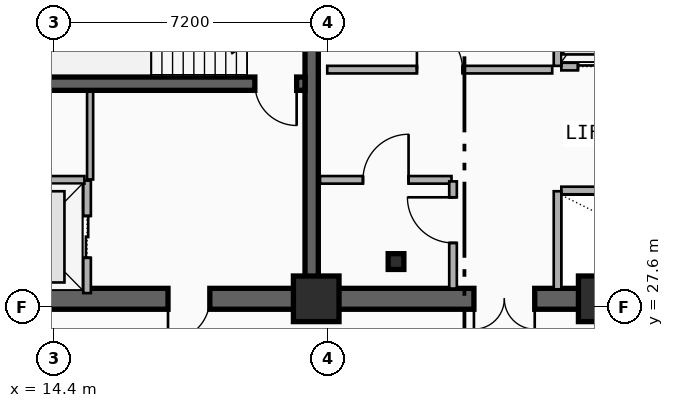
"""IFC4 building model, lengths in metres.
Left out: names, types, materials, properties, quantities, classifications, styles, units other than length and angle.
Written with IfcOpenShell. Run it as: python <this file> out.ifc"""

import sys

from ifc_helpers import new_model, si_unit, direction, frame, frame_2d, origin, origin_2d, place, context, subcontext, project, spatial, rectangle, i_section, extrude, element, fill, save


model = new_model("IFC4")
c1 = context("Model", 3, precision=1e-05, world=origin(), true_north=direction((0.0, 1.0)))
c2 = subcontext(c1, "Body", "Model", "MODEL_VIEW")
j1 = project(units=[si_unit("LENGTHUNIT", "METRE"), si_unit("PLANEANGLEUNIT", "RADIAN")], contexts=[c1])
p1 = place(None, origin())
s1 = spatial("IfcSite", under=j1, at=p1, CompositionType="ELEMENT")
p2 = place(p1, origin())
s2 = spatial("IfcBuilding", under=s1, at=p2, CompositionType="ELEMENT")
p3 = place(p2, frame((0.0, 0.0, 166.1)))
s3 = spatial("IfcBuildingStorey", under=s2, at=p3, CompositionType="ELEMENT", Elevation=166.1)
p4 = place(p3, frame((21.18, 27.82, 0.0), z_axis=(0.0, 0.0, 1.0), x_axis=(-1.0, 0.0, 0.0)))
e1 = element("IfcWall", 1, at=p4, inside=s3, PredefinedType="SHEAR", context=c2, shape_type="SweptSolid", body=[
    extrude(rectangle(XDim=9.03, YDim=0.55, at=frame_2d((4.515, 0.0))), origin(), (0.0, 0.0, 1.0), 3.55),
])
p5 = place(p4, frame((2.68, 0.0, 0.0)))
e2 = element("IfcOpeningElement", 2, at=p5, cuts=e1, PredefinedType="OPENING", context=c2, shape_type="SweptSolid", body=[
    extrude(rectangle(XDim=1.1, YDim=2.15, at=frame_2d((0.55, 1.075))), frame((0.0, 0.285, 0.0), z_axis=(0.0, -1.0, 0.0), x_axis=(1.0, 0.0, 0.0)), (0.0, 0.0, 1.0), 0.57),
])
p6 = place(p3, frame((33.15, 27.82, 0.0), z_axis=(0.0, 0.0, 1.0), x_axis=(-1.0, 0.0, 0.0)))
e3 = element("IfcWall", 3, at=p6, inside=s3, PredefinedType="SHEAR", context=c2, shape_type="SweptSolid", body=[
    extrude(rectangle(XDim=11.97, YDim=0.55, at=frame_2d((5.985, 0.0))), origin(), (0.0, 0.0, 1.0), 3.55),
])
p7 = place(p6, frame((6.1, 0.0, 0.0)))
e4 = element("IfcOpeningElement", 4, at=p7, cuts=e3, PredefinedType="OPENING", context=c2, shape_type="SweptSolid", body=[
    extrude(rectangle(XDim=1.6, YDim=2.2, at=frame_2d((0.8, 1.1))), frame((0.0, 0.285, 0.0), z_axis=(0.0, -1.0, 0.0), x_axis=(1.0, 0.0, 0.0)), (0.0, 0.0, 1.0), 0.57),
])
p8 = place(p3, frame((21.18, 28.095, 0.0), z_axis=(0.0, 0.0, 1.0), x_axis=(0.0, 1.0, 0.0)))
e5 = element("IfcWall", 5, at=p8, inside=s3, PredefinedType="SHEAR", context=c2, shape_type="SweptSolid", body=[
    extrude(rectangle(XDim=8.68, YDim=0.35, at=frame_2d((4.34, 0.0))), origin(), (0.0, 0.0, 1.0), 3.55),
])
p9 = place(p3, frame((21.005, 33.48, 0.0), z_axis=(0.0, 0.0, 1.0), x_axis=(-1.0, 0.0, 0.0)))
e6 = element("IfcWall", 6, at=p9, inside=s3, PredefinedType="SHEAR", context=c2, shape_type="SweptSolid", body=[
    extrude(rectangle(XDim=8.58, YDim=0.35, at=frame_2d((4.29, 0.0))), origin(), (0.0, 0.0, 1.0), 3.55),
])
p10 = place(p9, frame((0.22, 0.0, 0.0)))
e7 = element("IfcOpeningElement", 7, at=p10, cuts=e6, PredefinedType="OPENING", context=c2, shape_type="SweptSolid", body=[
    extrude(rectangle(XDim=1.1, YDim=2.15, at=frame_2d((0.55, 1.075))), frame((0.0, 0.185, 0.0), z_axis=(0.0, -1.0, 0.0), x_axis=(1.0, 0.0, 0.0)), (0.0, 0.0, 1.0), 0.37),
])
p11 = place(p3, frame((23.4, 28.8, 0.0), z_axis=(0.0, 0.0, 1.0), x_axis=(1.0, 0.0, 0.0)))
e8 = element("IfcColumn", 8, at=p11, inside=s3, PredefinedType="COLUMN", context=c2, shape_type="SweptSolid", body=[
    extrude(i_section(OverallWidth=0.413, OverallDepth=0.415, WebThickness=0.03, FlangeThickness=0.047, FilletRadius=0.015, at=origin_2d()), origin(), (0.0, 0.0, 1.0), 3.55),
])
for number, where, z_axis, x_axis in (
    (9, (21.3, 27.82, 0.0), (0.0, 0.0, 1.0), (1.0, 0.0, 0.0)),
    (10, (28.8, 27.82, 0.0), (0.0, 0.0, 1.0), (1.0, 0.0, 0.0)),
):
    element("IfcColumn", number, at=place(p3, frame(where, z_axis=z_axis, x_axis=x_axis)), inside=s3, PredefinedType="COLUMN", context=c2, shape_type="SweptSolid", body=[
        extrude(rectangle(XDim=1.2, YDim=1.2, at=origin_2d()), origin(), (0.0, 0.0, 1.0), 3.55),
    ])
p12 = place(p3, frame((15.27, 27.97, 0.0), z_axis=(0.0, 0.0, 1.0), x_axis=(0.0, 1.0, 0.0)))
e11 = element("IfcWall", 11, at=p12, inside=s3, PredefinedType="PARTITIONING", context=c2, shape_type="SweptSolid", body=[
    extrude(rectangle(XDim=2.96, YDim=0.2, at=frame_2d((1.48, 0.0))), origin(), (0.0, 0.0, 1.0), 2.36),
])
p13 = place(p12, frame((0.93, 0.0, 0.0)))
e12 = element("IfcOpeningElement", 12, at=p13, cuts=e11, PredefinedType="OPENING", context=c2, shape_type="SweptSolid", body=[
    extrude(rectangle(XDim=1.1, YDim=2.15, at=frame_2d((0.55, 1.075))), frame((0.0, 0.11, 0.0), z_axis=(0.0, -1.0, 0.0), x_axis=(1.0, 0.0, 0.0)), (0.0, 0.0, 1.0), 0.22),
])
p14 = place(p3, frame((12.45, 30.95, 0.0), z_axis=(0.0, 0.0, 1.0), x_axis=(1.0, 0.0, 0.0)))
e13 = element("IfcWall", 13, at=p14, inside=s3, PredefinedType="PARTITIONING", context=c2, shape_type="SweptSolid", body=[
    extrude(rectangle(XDim=2.75, YDim=0.2, at=frame_2d((1.375, 0.0))), origin(), (0.0, 0.0, 1.0), 2.36),
])
p15 = place(p3, frame((27.75, 30.67, 0.0), z_axis=(0.0, 0.0, 1.0), x_axis=(1.0, 0.0, 0.0)))
e14 = element("IfcWall", 14, at=p15, inside=s3, PredefinedType="PARTITIONING", context=c2, shape_type="SweptSolid", body=[
    extrude(rectangle(XDim=1.975, YDim=0.2, at=frame_2d((0.988, 0.0))), origin(), (0.0, 0.0, 1.0), 2.36),
])
p16 = place(p3, frame((27.65, 28.07, 0.0), z_axis=(0.0, 0.0, 1.0), x_axis=(0.0, 1.0, 0.0)))
e15 = element("IfcWall", 15, at=p16, inside=s3, PredefinedType="PARTITIONING", context=c2, shape_type="SweptSolid", body=[
    extrude(rectangle(XDim=2.58, YDim=0.2, at=frame_2d((1.29, 0.0))), origin(), (0.0, 0.0, 1.0), 2.36),
])
p17 = place(p3, frame((27.75, 33.93, 0.0), z_axis=(0.0, 0.0, 1.0), x_axis=(1.0, 0.0, 0.0)))
e16 = element("IfcWall", 16, at=p17, inside=s3, PredefinedType="PARTITIONING", context=c2, shape_type="SweptSolid", body=[
    extrude(rectangle(XDim=1.975, YDim=0.2, at=frame_2d((0.988, 0.0))), origin(), (0.0, 0.0, 1.0), 2.36),
])
p18 = place(p17, frame((0.438, 0.0, 0.0)))
e17 = element("IfcOpeningElement", 17, at=p18, cuts=e16, PredefinedType="OPENING", context=c2, shape_type="SweptSolid", body=[
    extrude(rectangle(XDim=1.1, YDim=2.15, at=frame_2d((0.55, 1.075))), frame((0.0, 0.11, 0.0), z_axis=(0.0, -1.0, 0.0), x_axis=(1.0, 0.0, 0.0)), (0.0, 0.0, 1.0), 0.22),
])
p19 = place(p3, frame((27.65, 33.95, 0.0), z_axis=(0.0, 0.0, 1.0), x_axis=(0.0, 1.0, 0.0)))
e18 = element("IfcWall", 18, at=p19, inside=s3, PredefinedType="PARTITIONING", context=c2, shape_type="SweptSolid", body=[
    extrude(rectangle(XDim=2.68, YDim=0.2, at=frame_2d((1.34, 0.0))), origin(), (0.0, 0.0, 1.0), 2.36),
])
p20 = place(p3, frame((21.4, 30.95, 0.0), z_axis=(0.0, 0.0, 1.0), x_axis=(1.0, 0.0, 0.0)))
e19 = element("IfcWall", 19, at=p20, inside=s3, PredefinedType="PARTITIONING", context=c2, shape_type="SweptSolid", body=[
    extrude(rectangle(XDim=3.46, YDim=0.2, at=frame_2d((1.73, 0.0))), origin(), (0.0, 0.0, 1.0), 2.36),
])
p21 = place(p20, frame((1.13, 0.0, 0.0)))
e20 = element("IfcOpeningElement", 20, at=p21, cuts=e19, PredefinedType="OPENING", context=c2, shape_type="SweptSolid", body=[
    extrude(rectangle(XDim=1.2, YDim=2.15, at=frame_2d((0.6, 1.075))), frame((0.0, 0.11, 0.0), z_axis=(0.0, -1.0, 0.0), x_axis=(1.0, 0.0, 0.0)), (0.0, 0.0, 1.0), 0.22),
])
p22 = place(p3, frame((21.59, 33.85, 0.0), z_axis=(0.0, 0.0, 1.0), x_axis=(1.0, 0.0, 0.0)))
e21 = element("IfcWall", 21, at=p22, inside=s3, PredefinedType="PARTITIONING", context=c2, shape_type="SweptSolid", body=[
    extrude(rectangle(XDim=5.92, YDim=0.2, at=frame_2d((2.96, 0.0))), origin(), (0.0, 0.0, 1.0), 2.36),
])
p23 = place(p22, frame((2.36, 0.0, 0.0)))
e22 = element("IfcOpeningElement", 22, at=p23, cuts=e21, PredefinedType="OPENING", context=c2, shape_type="SweptSolid", body=[
    extrude(rectangle(XDim=1.2, YDim=2.15, at=frame_2d((0.6, 1.075))), frame((0.0, 0.11, 0.0), z_axis=(0.0, -1.0, 0.0), x_axis=(1.0, 0.0, 0.0)), (0.0, 0.0, 1.0), 0.22),
])
p24 = place(p3, frame((24.9, 28.09, 0.0), z_axis=(0.0, 0.0, 1.0), x_axis=(0.0, 1.0, 0.0)))
e23 = element("IfcWall", 23, at=p24, inside=s3, PredefinedType="PARTITIONING", context=c2, shape_type="SweptSolid", body=[
    extrude(rectangle(XDim=2.82, YDim=0.2, at=frame_2d((1.41, 0.0))), origin(), (0.0, 0.0, 1.0), 2.67),
])
p25 = place(p24, frame((1.201, 0.0, 0.0)))
e24 = element("IfcOpeningElement", 24, at=p25, cuts=e23, PredefinedType="OPENING", context=c2, shape_type="SweptSolid", body=[
    extrude(rectangle(XDim=1.2, YDim=2.15, at=frame_2d((0.6, 1.075))), frame((0.0, 0.11, 0.0), z_axis=(0.0, -1.0, 0.0), x_axis=(1.0, 0.0, 0.0)), (0.0, 0.0, 1.0), 0.22),
])
p26 = place(p3, frame((15.35, 30.96, 0.0), z_axis=(0.0, 0.0, 1.0), x_axis=(0.0, 1.0, 0.0)))
e25 = element("IfcWall", 25, at=p26, inside=s3, PredefinedType="PARTITIONING", context=c2, shape_type="SweptSolid", body=[
    extrude(rectangle(XDim=2.31, YDim=0.16, at=frame_2d((1.155, 0.0))), origin(), (0.0, 0.0, 1.0), 3.29),
])
p27 = place(p13, origin())
e26 = element("IfcDoor", 26, at=p27, inside=s3, OperationType="DOUBLE_DOOR_SLIDING", PredefinedType="DOOR", context=c2, shape_type="SweptSolid", body=[
    extrude(rectangle(XDim=1.1, YDim=2.15, at=frame_2d((0.55, 1.075))), frame((0.0, 0.025, 0.0), z_axis=(0.0, -1.0, 0.0), x_axis=(1.0, 0.0, 0.0)), (0.0, 0.0, 1.0), 0.05),
])
fill(e12, e26)
p28 = place(p18, origin())
e27 = element("IfcDoor", 27, at=p28, inside=s3, OperationType="DOUBLE_DOOR_SLIDING", PredefinedType="DOOR", context=c2, shape_type="SweptSolid", body=[
    extrude(rectangle(XDim=1.1, YDim=2.15, at=frame_2d((0.55, 1.075))), frame((0.0, 0.025, 0.0), z_axis=(0.0, -1.0, 0.0), x_axis=(1.0, 0.0, 0.0)), (0.0, 0.0, 1.0), 0.05),
])
fill(e17, e27)
p29 = place(p10, origin())
e28 = element("IfcDoor", 28, at=p29, inside=s3, OperationType="SINGLE_SWING_LEFT", PredefinedType="DOOR", context=c2, shape_type="SweptSolid", body=[
    extrude(rectangle(XDim=1.1, YDim=2.15, at=frame_2d((0.55, 1.075))), frame((0.0, 0.025, 0.0), z_axis=(0.0, -1.0, 0.0), x_axis=(1.0, 0.0, 0.0)), (0.0, 0.0, 1.0), 0.05),
])
fill(e7, e28)
p30 = place(p5, origin())
e29 = element("IfcDoor", 29, at=p30, inside=s3, OperationType="SINGLE_SWING_RIGHT", PredefinedType="DOOR", context=c2, shape_type="SweptSolid", body=[
    extrude(rectangle(XDim=1.1, YDim=2.15, at=frame_2d((0.55, 1.075))), frame((0.0, 0.025, 0.0), z_axis=(0.0, -1.0, 0.0), x_axis=(1.0, 0.0, 0.0)), (0.0, 0.0, 1.0), 0.05),
])
fill(e2, e29)
p31 = place(p7, origin())
e30 = element("IfcDoor", 30, at=p31, inside=s3, OperationType="SINGLE_SWING_LEFT", PredefinedType="DOOR", context=c2, shape_type="SweptSolid", body=[
    extrude(rectangle(XDim=1.6, YDim=2.2, at=frame_2d((0.8, 1.1))), frame((0.0, 0.025, 0.0), z_axis=(0.0, -1.0, 0.0), x_axis=(1.0, 0.0, 0.0)), (0.0, 0.0, 1.0), 0.05),
])
fill(e4, e30)
p32 = place(p21, origin())
e31 = element("IfcDoor", 31, at=p32, inside=s3, OperationType="SINGLE_SWING_RIGHT", PredefinedType="DOOR", context=c2, shape_type="SweptSolid", body=[
    extrude(rectangle(XDim=1.2, YDim=2.15, at=frame_2d((0.6, 1.075))), frame((0.0, 0.025, 0.0), z_axis=(0.0, -1.0, 0.0), x_axis=(1.0, 0.0, 0.0)), (0.0, 0.0, 1.0), 0.05),
])
fill(e20, e31)
p33 = place(p23, origin())
e32 = element("IfcDoor", 32, at=p33, inside=s3, OperationType="SINGLE_SWING_LEFT", PredefinedType="DOOR", context=c2, shape_type="SweptSolid", body=[
    extrude(rectangle(XDim=1.2, YDim=2.15, at=frame_2d((0.6, 1.075))), frame((0.0, 0.025, 0.0), z_axis=(0.0, -1.0, 0.0), x_axis=(1.0, 0.0, 0.0)), (0.0, 0.0, 1.0), 0.05),
])
fill(e22, e32)
p34 = place(p25, origin())
e33 = element("IfcDoor", 33, at=p34, inside=s3, OperationType="SINGLE_SWING_RIGHT", PredefinedType="DOOR", context=c2, shape_type="SweptSolid", body=[
    extrude(rectangle(XDim=1.2, YDim=2.15, at=frame_2d((0.6, 1.075))), frame((0.0, 0.025, 0.0), z_axis=(0.0, -1.0, 0.0), x_axis=(1.0, 0.0, 0.0)), (0.0, 0.0, 1.0), 0.05),
])
fill(e24, e33)
save(model, sys.argv[1])
